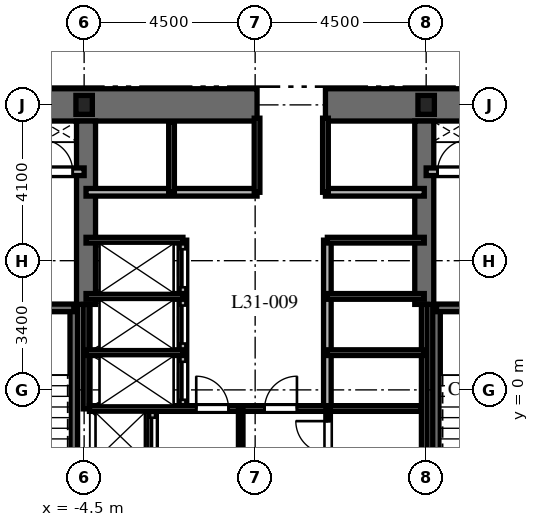
"""IFC4 building model, lengths in metres.
Left out: names, types, materials, properties, quantities, classifications, styles, units other than length and angle.
Written with IfcOpenShell. Run it as: python <this file> out.ifc"""

import sys

from ifc_helpers import new_model, si_unit, direction, frame, frame_2d, origin, origin_2d, place, context, subcontext, project, spatial, rectangle, i_section, extrude, element, fill, save


model = new_model("IFC4")
c1 = context("Model", 3, precision=1e-05, world=origin(), true_north=direction((0.0, 1.0)))
c2 = subcontext(c1, "Body", "Model", "MODEL_VIEW")
j1 = project(units=[si_unit("LENGTHUNIT", "METRE"), si_unit("PLANEANGLEUNIT", "RADIAN")], contexts=[c1])
p1 = place(None, origin())
s1 = spatial("IfcSite", under=j1, at=p1, CompositionType="ELEMENT")
p2 = place(p1, origin())
s2 = spatial("IfcBuilding", under=s1, at=p2, CompositionType="ELEMENT")
p3 = place(p2, frame((0.0, 0.0, 128.4)))
s3 = spatial("IfcBuildingStorey", under=s2, at=p3, CompositionType="ELEMENT", Elevation=128.4)
p4 = place(p3, frame((-9.425, 7.5, 0.0), z_axis=(0.0, 0.0, 1.0), x_axis=(1.0, 0.0, 0.0)))
e1 = element("IfcWall", 1, at=p4, inside=s3, PredefinedType="SHEAR", context=c2, shape_type="SweptSolid", body=[
    extrude(rectangle(XDim=9.475, YDim=0.85, at=frame_2d((4.738, 0.0))), origin(), (0.0, 0.0, 1.0), 3.7),
])
p5 = place(p3, frame((1.85, 7.5, 0.0), z_axis=(0.0, 0.0, 1.0), x_axis=(1.0, 0.0, 0.0)))
e2 = element("IfcWall", 2, at=p5, inside=s3, PredefinedType="SHEAR", context=c2, shape_type="SweptSolid", body=[
    extrude(rectangle(XDim=7.575, YDim=0.85, at=frame_2d((3.788, 0.0))), origin(), (0.0, 0.0, 1.0), 3.7),
])
for number, where, z_axis, x_axis in (
    (3, (-4.45, 2.25, 0.0), (0.0, 0.0, 1.0), (0.0, 1.0, 0.0)),
    (4, (4.45, 2.25, 0.0), (0.0, 0.0, 1.0), (0.0, 1.0, 0.0)),
):
    element("IfcWall", number, at=place(p3, frame(where, z_axis=z_axis, x_axis=x_axis)), inside=s3, PredefinedType="SHEAR", context=c2, shape_type="SweptSolid", body=[
        extrude(rectangle(XDim=4.825, YDim=0.5, at=frame_2d((2.413, 0.0))), origin(), (0.0, 0.0, 1.0), 3.7),
    ])
p6 = place(p3, frame((-4.772, -6.985, 0.0), z_axis=(0.0, 0.0, 1.0), x_axis=(0.0, 1.0, 0.0)))
e5 = element("IfcWall", 5, at=p6, inside=s3, PredefinedType="SHEAR", context=c2, shape_type="SweptSolid", body=[
    extrude(rectangle(XDim=9.143, YDim=0.2, at=frame_2d((4.572, 0.0))), origin(), (0.0, 0.0, 1.0), 3.7),
])
p7 = place(p3, frame((-8.458, 2.158, 0.0), z_axis=(0.0, 0.0, 1.0), x_axis=(1.0, 0.0, 0.0)))
e6 = element("IfcWall", 6, at=p7, inside=s3, PredefinedType="SHEAR", context=c2, shape_type="SweptSolid", body=[
    extrude(rectangle(XDim=3.686, YDim=0.2, at=frame_2d((1.843, 0.0))), origin(), (0.0, 0.0, 1.0), 3.7),
])
p8 = place(p7, frame((1.3, 0.0, 0.0)))
e7 = element("IfcOpeningElement", 7, at=p8, cuts=e6, PredefinedType="OPENING", context=c2, shape_type="SweptSolid", body=[
    extrude(rectangle(XDim=1.0, YDim=2.15, at=frame_2d((0.5, 1.075))), frame((0.0, 0.11, 0.0), z_axis=(0.0, -1.0, 0.0), x_axis=(1.0, 0.0, 0.0)), (0.0, 0.0, 1.0), 0.22),
])
p9 = place(p3, frame((4.772, -6.985, 0.0), z_axis=(0.0, 0.0, 1.0), x_axis=(0.0, 1.0, 0.0)))
e8 = element("IfcWall", 8, at=p9, inside=s3, PredefinedType="SHEAR", context=c2, shape_type="SweptSolid", body=[
    extrude(rectangle(XDim=9.143, YDim=0.2, at=frame_2d((4.572, 0.0))), origin(), (0.0, 0.0, 1.0), 3.7),
])
p10 = place(p3, frame((4.772, 2.158, 0.0), z_axis=(0.0, 0.0, 1.0), x_axis=(1.0, 0.0, 0.0)))
e9 = element("IfcWall", 9, at=p10, inside=s3, PredefinedType="SHEAR", context=c2, shape_type="SweptSolid", body=[
    extrude(rectangle(XDim=3.686, YDim=0.2, at=frame_2d((1.843, 0.0))), origin(), (0.0, 0.0, 1.0), 3.7),
])
p11 = place(p10, frame((1.35, 0.0, 0.0)))
e10 = element("IfcOpeningElement", 10, at=p11, cuts=e9, PredefinedType="OPENING", context=c2, shape_type="SweptSolid", body=[
    extrude(rectangle(XDim=1.0, YDim=2.15, at=frame_2d((0.5, 1.075))), frame((0.0, 0.11, 0.0), z_axis=(0.0, -1.0, 0.0), x_axis=(1.0, 0.0, 0.0)), (0.0, 0.0, 1.0), 0.22),
])
for number, where, z_axis, x_axis in (
    (11, (4.5, 7.5, 0.0), (0.0, 0.0, 1.0), (1.0, 0.0, 0.0)),
    (12, (-4.5, 7.5, 0.0), (0.0, 0.0, 1.0), (1.0, 0.0, 0.0)),
):
    element("IfcColumn", number, at=place(p3, frame(where, z_axis=z_axis, x_axis=x_axis)), inside=s3, PredefinedType="COLUMN", context=c2, shape_type="SweptSolid", body=[
        extrude(i_section(OverallWidth=0.432, OverallDepth=0.498, WebThickness=0.056, FlangeThickness=0.089, at=origin_2d()), origin(), (0.0, 0.0, 1.0), 3.7),
    ])
p12 = place(p3, frame((-8.55, 5.74, 0.0), z_axis=(0.0, 0.0, 1.0), x_axis=(1.0, 0.0, 0.0)))
e13 = element("IfcWall", 13, at=p12, inside=s3, PredefinedType="PARTITIONING", context=c2, shape_type="SweptSolid", body=[
    extrude(rectangle(XDim=4.05, YDim=0.2, at=frame_2d((2.025, 0.0))), origin(), (0.0, 0.0, 1.0), 3.4),
])
p13 = place(p12, frame((0.75, 0.0, 0.0)))
e14 = element("IfcOpeningElement", 14, at=p13, cuts=e13, PredefinedType="OPENING", context=c2, shape_type="SweptSolid", body=[
    extrude(rectangle(XDim=1.1, YDim=2.2, at=frame_2d((0.55, 1.1))), frame((0.0, 0.11, 0.0), z_axis=(0.0, -1.0, 0.0), x_axis=(1.0, 0.0, 0.0)), (0.0, 0.0, 1.0), 0.22),
])
p14 = place(p12, frame((2.9, 0.0, 0.0)))
e15 = element("IfcOpeningElement", 15, at=p14, cuts=e13, PredefinedType="OPENING", context=c2, shape_type="SweptSolid", body=[
    extrude(rectangle(XDim=0.85, YDim=2.03, at=frame_2d((0.425, 1.015))), frame((0.0, 0.11, 0.0), z_axis=(0.0, -1.0, 0.0), x_axis=(1.0, 0.0, 0.0)), (0.0, 0.0, 1.0), 0.22),
])
p15 = place(p3, frame((4.5, 5.74, 0.0), z_axis=(0.0, 0.0, 1.0), x_axis=(1.0, 0.0, 0.0)))
e16 = element("IfcWall", 16, at=p15, inside=s3, PredefinedType="PARTITIONING", context=c2, shape_type="SweptSolid", body=[
    extrude(rectangle(XDim=4.05, YDim=0.2, at=frame_2d((2.025, 0.0))), origin(), (0.0, 0.0, 1.0), 3.4),
])
p16 = place(p15, frame((0.3, 0.0, 0.0)))
e17 = element("IfcOpeningElement", 17, at=p16, cuts=e16, PredefinedType="OPENING", context=c2, shape_type="SweptSolid", body=[
    extrude(rectangle(XDim=0.85, YDim=2.03, at=frame_2d((0.425, 1.015))), frame((0.0, 0.11, 0.0), z_axis=(0.0, -1.0, 0.0), x_axis=(1.0, 0.0, 0.0)), (0.0, 0.0, 1.0), 0.22),
])
p17 = place(p15, frame((2.15, 0.0, 0.0)))
e18 = element("IfcOpeningElement", 18, at=p17, cuts=e16, PredefinedType="OPENING", context=c2, shape_type="SweptSolid", body=[
    extrude(rectangle(XDim=1.1, YDim=2.2, at=frame_2d((0.55, 1.1))), frame((0.0, 0.11, 0.0), z_axis=(0.0, -1.0, 0.0), x_axis=(1.0, 0.0, 0.0)), (0.0, 0.0, 1.0), 0.22),
])
p18 = place(p3, frame((-2.7, -1.972, 0.0), z_axis=(0.0, 0.0, 1.0), x_axis=(0.0, 1.0, 0.0)))
e19 = element("IfcWall", 19, at=p18, inside=s3, PredefinedType="PARTITIONING", context=c2, shape_type="SweptSolid", body=[
    extrude(rectangle(XDim=1.472, YDim=0.2, at=frame_2d((0.736, 0.0))), origin(), (0.0, 0.0, 1.0), 3.4),
])
p19 = place(p18, frame((0.24, 0.0, 0.0)))
e20 = element("IfcOpeningElement", 20, at=p19, cuts=e19, PredefinedType="OPENING", context=c2, shape_type="SweptSolid", body=[
    extrude(rectangle(XDim=1.0, YDim=2.2, at=frame_2d((0.5, 1.1))), frame((0.0, 0.11, 0.0), z_axis=(0.0, -1.0, 0.0), x_axis=(1.0, 0.0, 0.0)), (0.0, 0.0, 1.0), 0.22),
])
p20 = place(p3, frame((-4.45, 5.2, 0.0), z_axis=(0.0, 0.0, 1.0), x_axis=(1.0, 0.0, 0.0)))
e21 = element("IfcWall", 21, at=p20, inside=s3, PredefinedType="PARTITIONING", context=c2, shape_type="SweptSolid", body=[
    extrude(rectangle(XDim=4.5, YDim=0.2, at=frame_2d((2.25, 0.0))), origin(), (0.0, 0.0, 1.0), 3.4),
])
p21 = place(p3, frame((1.85, 5.2, 0.0), z_axis=(0.0, 0.0, 1.0), x_axis=(1.0, 0.0, 0.0)))
e22 = element("IfcWall", 22, at=p21, inside=s3, PredefinedType="PARTITIONING", context=c2, shape_type="SweptSolid", body=[
    extrude(rectangle(XDim=2.6, YDim=0.2, at=frame_2d((1.3, 0.0))), origin(), (0.0, 0.0, 1.0), 3.4),
])
p22 = place(p3, frame((-2.2, 5.2, 0.0), z_axis=(0.0, 0.0, 1.0), x_axis=(0.0, 1.0, 0.0)))
e23 = element("IfcWall", 23, at=p22, inside=s3, PredefinedType="PARTITIONING", context=c2, shape_type="SweptSolid", body=[
    extrude(rectangle(XDim=1.85, YDim=0.15, at=frame_2d((0.925, 0.0))), origin(), (0.0, 0.0, 1.0), 3.4),
])
for number, where, z_axis, x_axis in (
    (24, (0.05, 5.2, 0.0), (0.0, 0.0, 1.0), (0.0, 1.0, 0.0)),
    (25, (1.85, 5.2, 0.0), (0.0, 0.0, 1.0), (0.0, 1.0, 0.0)),
):
    element("IfcWall", number, at=place(p3, frame(where, z_axis=z_axis, x_axis=x_axis)), inside=s3, PredefinedType="PARTITIONING", context=c2, shape_type="SweptSolid", body=[
        extrude(rectangle(XDim=1.95, YDim=0.15, at=frame_2d((0.975, 0.0))), origin(), (0.0, 0.0, 1.0), 3.4),
    ])
p23 = place(p3, frame((-4.45, -0.5, 0.0), z_axis=(0.0, 0.0, 1.0), x_axis=(0.0, 1.0, 0.0)))
e26 = element("IfcWall", 26, at=p23, inside=s3, PredefinedType="PARTITIONING", context=c2, shape_type="SweptSolid", body=[
    extrude(rectangle(XDim=2.75, YDim=0.15, at=frame_2d((1.375, 0.0))), origin(), (0.0, 0.0, 1.0), 3.4),
])
p24 = place(p3, frame((4.45, -1.972, 0.0), z_axis=(0.0, 0.0, 1.0), x_axis=(0.0, 1.0, 0.0)))
e27 = element("IfcWall", 27, at=p24, inside=s3, PredefinedType="PARTITIONING", context=c2, shape_type="SweptSolid", body=[
    extrude(rectangle(XDim=4.222, YDim=0.15, at=frame_2d((2.111, 0.0))), origin(), (0.0, 0.0, 1.0), 3.4),
])
p25 = place(p3, frame((-1.9, -0.5, 0.0), z_axis=(0.0, 0.0, 1.0), x_axis=(0.0, 1.0, 0.0)))
e28 = element("IfcWall", 28, at=p25, inside=s3, PredefinedType="PARTITIONING", context=c2, shape_type="SweptSolid", body=[
    extrude(rectangle(XDim=4.44, YDim=0.2, at=frame_2d((2.22, 0.0))), origin(), (0.0, 0.0, 1.0), 3.4),
])
p26 = place(p25, frame((0.24, 0.0, 0.0)))
e29 = element("IfcOpeningElement", 29, at=p26, cuts=e28, PredefinedType="OPENING", context=c2, shape_type="SweptSolid", body=[
    extrude(rectangle(XDim=1.0, YDim=2.2, at=frame_2d((0.5, 1.1))), frame((0.0, 0.11, 0.0), z_axis=(0.0, -1.0, 0.0), x_axis=(1.0, 0.0, 0.0)), (0.0, 0.0, 1.0), 0.22),
])
p27 = place(p25, frame((1.72, 0.0, 0.0)))
e30 = element("IfcOpeningElement", 30, at=p27, cuts=e28, PredefinedType="OPENING", context=c2, shape_type="SweptSolid", body=[
    extrude(rectangle(XDim=1.0, YDim=2.2, at=frame_2d((0.5, 1.1))), frame((0.0, 0.11, 0.0), z_axis=(0.0, -1.0, 0.0), x_axis=(1.0, 0.0, 0.0)), (0.0, 0.0, 1.0), 0.22),
])
p28 = place(p25, frame((3.2, 0.0, 0.0)))
e31 = element("IfcOpeningElement", 31, at=p28, cuts=e28, PredefinedType="OPENING", context=c2, shape_type="SweptSolid", body=[
    extrude(rectangle(XDim=1.0, YDim=2.2, at=frame_2d((0.5, 1.1))), frame((0.0, 0.11, 0.0), z_axis=(0.0, -1.0, 0.0), x_axis=(1.0, 0.0, 0.0)), (0.0, 0.0, 1.0), 0.22),
])
for number, where, z_axis, x_axis in (
    (32, (-4.45, 3.94, 0.0), (0.0, 0.0, 1.0), (1.0, 0.0, 0.0)),
    (33, (-4.45, 0.98, 0.0), (0.0, 0.0, 1.0), (1.0, 0.0, 0.0)),
    (34, (-4.45, 2.46, 0.0), (0.0, 0.0, 1.0), (1.0, 0.0, 0.0)),
):
    element("IfcWall", number, at=place(p3, frame(where, z_axis=z_axis, x_axis=x_axis)), inside=s3, PredefinedType="PARTITIONING", context=c2, shape_type="SweptSolid", body=[
        extrude(rectangle(XDim=2.55, YDim=0.15, at=frame_2d((1.275, 0.0))), origin(), (0.0, 0.0, 1.0), 3.4),
    ])
p29 = place(p3, frame((1.9, -0.5, 0.0), z_axis=(0.0, 0.0, 1.0), x_axis=(0.0, 1.0, 0.0)))
e35 = element("IfcWall", 35, at=p29, inside=s3, PredefinedType="PARTITIONING", context=c2, shape_type="SweptSolid", body=[
    extrude(rectangle(XDim=4.44, YDim=0.2, at=frame_2d((2.22, 0.0))), origin(), (0.0, 0.0, 1.0), 3.4),
])
for number, where, z_axis, x_axis in (
    (36, (1.9, 3.94, 0.0), (0.0, 0.0, 1.0), (1.0, 0.0, 0.0)),
    (37, (1.9, 0.98, 0.0), (0.0, 0.0, 1.0), (1.0, 0.0, 0.0)),
    (38, (1.9, 2.46, 0.0), (0.0, 0.0, 1.0), (1.0, 0.0, 0.0)),
):
    element("IfcWall", number, at=place(p3, frame(where, z_axis=z_axis, x_axis=x_axis)), inside=s3, PredefinedType="PARTITIONING", context=c2, shape_type="SweptSolid", body=[
        extrude(rectangle(XDim=2.55, YDim=0.15, at=frame_2d((1.275, 0.0))), origin(), (0.0, 0.0, 1.0), 3.4),
    ])
p30 = place(p3, frame((-4.36, -0.49, 0.0), z_axis=(0.0, 0.0, 1.0), x_axis=(1.0, 0.0, 0.0)))
e39 = element("IfcWall", 39, at=p30, inside=s3, PredefinedType="PARTITIONING", context=c2, shape_type="SweptSolid", body=[
    extrude(rectangle(XDim=8.72, YDim=0.15, at=frame_2d((4.36, 0.0))), origin(), (0.0, 0.0, 1.0), 3.4),
])
p31 = place(p30, frame((2.81, 0.0, 0.0)))
e40 = element("IfcOpeningElement", 40, at=p31, cuts=e39, PredefinedType="OPENING", context=c2, shape_type="SweptSolid", body=[
    extrude(rectangle(XDim=0.85, YDim=2.03, at=frame_2d((0.425, 1.015))), frame((0.0, 0.085, 0.0), z_axis=(0.0, -1.0, 0.0), x_axis=(1.0, 0.0, 0.0)), (0.0, 0.0, 1.0), 0.17),
])
p32 = place(p30, frame((4.61, 0.0, 0.0)))
e41 = element("IfcOpeningElement", 41, at=p32, cuts=e39, PredefinedType="OPENING", context=c2, shape_type="SweptSolid", body=[
    extrude(rectangle(XDim=0.85, YDim=2.03, at=frame_2d((0.425, 1.015))), frame((0.0, 0.085, 0.0), z_axis=(0.0, -1.0, 0.0), x_axis=(1.0, 0.0, 0.0)), (0.0, 0.0, 1.0), 0.17),
])
p33 = place(p3, frame((-0.38, -1.972, 0.0), z_axis=(0.0, 0.0, 1.0), x_axis=(0.0, 1.0, 0.0)))
e42 = element("IfcWall", 42, at=p33, inside=s3, PredefinedType="PARTITIONING", context=c2, shape_type="SweptSolid", body=[
    extrude(rectangle(XDim=1.472, YDim=0.12, at=frame_2d((0.736, 0.0))), origin(), (0.0, 0.0, 1.0), 3.4),
])
p34 = place(p3, frame((1.92, -1.972, 0.0), z_axis=(0.0, 0.0, 1.0), x_axis=(0.0, 1.0, 0.0)))
e43 = element("IfcWall", 43, at=p34, inside=s3, PredefinedType="PARTITIONING", context=c2, shape_type="SweptSolid", body=[
    extrude(rectangle(XDim=1.472, YDim=0.12, at=frame_2d((0.736, 0.0))), origin(), (0.0, 0.0, 1.0), 3.4),
])
p35 = place(p34, frame((0.3, 0.0, 0.0)))
e44 = element("IfcOpeningElement", 44, at=p35, cuts=e43, PredefinedType="OPENING", context=c2, shape_type="SweptSolid", body=[
    extrude(rectangle(XDim=0.85, YDim=2.03, at=frame_2d((0.425, 1.015))), frame((0.0, 0.07, 0.0), z_axis=(0.0, -1.0, 0.0), x_axis=(1.0, 0.0, 0.0)), (0.0, 0.0, 1.0), 0.14),
])
p36 = place(p14, origin())
e45 = element("IfcDoor", 45, at=p36, inside=s3, OperationType="SINGLE_SWING_LEFT", PredefinedType="DOOR", context=c2, shape_type="SweptSolid", body=[
    extrude(rectangle(XDim=0.85, YDim=2.03, at=frame_2d((0.425, 1.015))), frame((0.0, 0.025, 0.0), z_axis=(0.0, -1.0, 0.0), x_axis=(1.0, 0.0, 0.0)), (0.0, 0.0, 1.0), 0.05),
])
fill(e15, e45)
p37 = place(p16, origin())
e46 = element("IfcDoor", 46, at=p37, inside=s3, OperationType="SINGLE_SWING_RIGHT", PredefinedType="DOOR", context=c2, shape_type="SweptSolid", body=[
    extrude(rectangle(XDim=0.85, YDim=2.03, at=frame_2d((0.425, 1.015))), frame((0.0, 0.025, 0.0), z_axis=(0.0, -1.0, 0.0), x_axis=(1.0, 0.0, 0.0)), (0.0, 0.0, 1.0), 0.05),
])
fill(e17, e46)
p38 = place(p19, origin())
e47 = element("IfcDoor", 47, at=p38, inside=s3, OperationType="SLIDING_TO_LEFT", PredefinedType="DOOR", context=c2, shape_type="SweptSolid", body=[
    extrude(rectangle(XDim=1.0, YDim=2.2, at=frame_2d((0.5, 1.1))), frame((0.0, 0.025, 0.0), z_axis=(0.0, -1.0, 0.0), x_axis=(1.0, 0.0, 0.0)), (0.0, 0.0, 1.0), 0.05),
])
fill(e20, e47)
p39 = place(p26, origin())
e48 = element("IfcDoor", 48, at=p39, inside=s3, OperationType="SLIDING_TO_LEFT", PredefinedType="DOOR", context=c2, shape_type="SweptSolid", body=[
    extrude(rectangle(XDim=1.0, YDim=2.2, at=frame_2d((0.5, 1.1))), frame((0.0, 0.025, 0.0), z_axis=(0.0, -1.0, 0.0), x_axis=(1.0, 0.0, 0.0)), (0.0, 0.0, 1.0), 0.05),
])
fill(e29, e48)
p40 = place(p27, origin())
e49 = element("IfcDoor", 49, at=p40, inside=s3, OperationType="SLIDING_TO_LEFT", PredefinedType="DOOR", context=c2, shape_type="SweptSolid", body=[
    extrude(rectangle(XDim=1.0, YDim=2.2, at=frame_2d((0.5, 1.1))), frame((0.0, 0.025, 0.0), z_axis=(0.0, -1.0, 0.0), x_axis=(1.0, 0.0, 0.0)), (0.0, 0.0, 1.0), 0.05),
])
fill(e30, e49)
p41 = place(p28, origin())
e50 = element("IfcDoor", 50, at=p41, inside=s3, OperationType="SLIDING_TO_LEFT", PredefinedType="DOOR", context=c2, shape_type="SweptSolid", body=[
    extrude(rectangle(XDim=1.0, YDim=2.2, at=frame_2d((0.5, 1.1))), frame((0.0, 0.025, 0.0), z_axis=(0.0, -1.0, 0.0), x_axis=(1.0, 0.0, 0.0)), (0.0, 0.0, 1.0), 0.05),
])
fill(e31, e50)
p42 = place(p31, origin())
e51 = element("IfcDoor", 51, at=p42, inside=s3, OperationType="SINGLE_SWING_LEFT", PredefinedType="DOOR", context=c2, shape_type="SweptSolid", body=[
    extrude(rectangle(XDim=0.85, YDim=2.03, at=frame_2d((0.425, 1.015))), frame((0.0, 0.025, 0.0), z_axis=(0.0, -1.0, 0.0), x_axis=(1.0, 0.0, 0.0)), (0.0, 0.0, 1.0), 0.05),
])
fill(e40, e51)
p43 = place(p32, origin())
e52 = element("IfcDoor", 52, at=p43, inside=s3, OperationType="SINGLE_SWING_RIGHT", PredefinedType="DOOR", context=c2, shape_type="SweptSolid", body=[
    extrude(rectangle(XDim=0.85, YDim=2.03, at=frame_2d((0.425, 1.015))), frame((0.0, 0.025, 0.0), z_axis=(0.0, -1.0, 0.0), x_axis=(1.0, 0.0, 0.0)), (0.0, 0.0, 1.0), 0.05),
])
fill(e41, e52)
p44 = place(p35, origin())
e53 = element("IfcDoor", 53, at=p44, inside=s3, OperationType="SINGLE_SWING_RIGHT", PredefinedType="DOOR", context=c2, shape_type="SweptSolid", body=[
    extrude(rectangle(XDim=0.85, YDim=2.03, at=frame_2d((0.425, 1.015))), frame((0.0, 0.025, 0.0), z_axis=(0.0, -1.0, 0.0), x_axis=(1.0, 0.0, 0.0)), (0.0, 0.0, 1.0), 0.05),
])
fill(e44, e53)
save(model, sys.argv[1])
